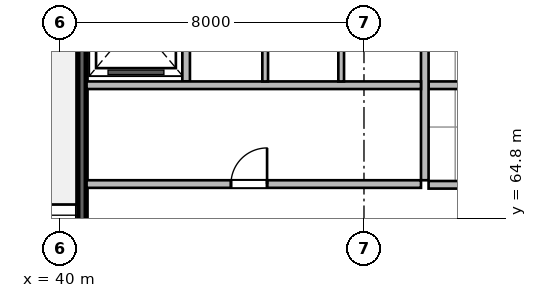
"""IFC4 building model, lengths in metres.
Left out: names, types, materials, properties, quantities, classifications, styles, units other than length and angle.
Written with IfcOpenShell. Run it as: python <this file> out.ifc"""

import sys

from ifc_helpers import new_model, si_unit, direction, frame, frame_2d, origin, place, context, subcontext, project, spatial, rectangle, extrude, source, transform, mapped, element, fill, save


model = new_model("IFC4")
c1 = context("Model", 3, precision=1e-05, world=origin(), true_north=direction((0.0, 1.0)))
c2 = subcontext(c1, "Body", "Model", "MODEL_VIEW")
j1 = project(units=[si_unit("LENGTHUNIT", "METRE"), si_unit("PLANEANGLEUNIT", "RADIAN")], contexts=[c1])
p1 = place(None, origin())
s1 = spatial("IfcSite", under=j1, at=p1, CompositionType="ELEMENT")
p2 = place(p1, origin())
s2 = spatial("IfcBuilding", under=s1, at=p2, CompositionType="ELEMENT")
p3 = place(p2, frame((0.0, 0.0, 275.7)))
s3 = spatial("IfcBuildingStorey", under=s2, at=p3, CompositionType="ELEMENT", Elevation=275.7)
m1 = source(origin(), c2, "Body", "SweptSolid", [
    extrude(rectangle(XDim=11.2, YDim=0.22, at=frame_2d((5.6, 0.0))), origin(), (0.0, 0.0, 1.0), 3.9),
])
p4 = place(p3, frame((40.58, 60.6, 0.0), z_axis=(0.0, 0.0, 1.0), x_axis=(0.0, 1.0, 0.0)))
e1 = element("IfcWall", 1, at=p4, inside=s3, PredefinedType="SHEAR", context=c2, shape_type="MappedRepresentation", body=[
    mapped(m1, transform((0.0, 0.0, 0.0), scale=1.0)),
])
m2 = source(origin(), c2, "Body", "SweptSolid", [
    extrude(rectangle(XDim=5.62, YDim=0.2, at=frame_2d((2.81, 0.0))), origin(), (0.0, 0.0, 1.0), 3.64),
])
p5 = place(p3, frame((49.7, 68.3, 0.0), z_axis=(0.0, 0.0, 1.0), x_axis=(1.0, 0.0, 0.0)))
e2 = element("IfcWall", 2, at=p5, inside=s3, PredefinedType="SOLIDWALL", context=c2, shape_type="MappedRepresentation", body=[
    mapped(m2, transform((0.0, 0.0, 0.0), scale=1.0)),
])
p6 = place(p5, frame((1.6, 0.0, 0.0)))
e3 = element("IfcOpeningElement", 3, at=p6, cuts=e2, PredefinedType="OPENING", context=c2, shape_type="SweptSolid", body=[
    extrude(rectangle(XDim=1.1, YDim=2.15, at=frame_2d((0.55, 1.075))), frame((0.0, 0.11, 0.0), z_axis=(0.0, -1.0, 0.0), x_axis=(1.0, 0.0, 0.0)), (0.0, 0.0, 1.0), 0.22),
])
p7 = place(p5, frame((3.7, 0.0, 0.0)))
e4 = element("IfcOpeningElement", 4, at=p7, cuts=e2, PredefinedType="OPENING", context=c2, shape_type="SweptSolid", body=[
    extrude(rectangle(XDim=1.1, YDim=2.15, at=frame_2d((0.55, 1.075))), frame((0.0, 0.11, 0.0), z_axis=(0.0, -1.0, 0.0), x_axis=(1.0, 0.0, 0.0)), (0.0, 0.0, 1.0), 0.22),
])
m3 = source(origin(), c2, "Body", "SweptSolid", [
    extrude(rectangle(XDim=5.8, YDim=0.2, at=frame_2d((2.9, 0.0))), origin(), (0.0, 0.0, 1.0), 3.64),
])
p8 = place(p3, frame((49.6, 65.8, 0.0), z_axis=(0.0, 0.0, 1.0), x_axis=(0.0, 1.0, 0.0)))
e5 = element("IfcWall", 5, at=p8, inside=s3, PredefinedType="SOLIDWALL", context=c2, shape_type="MappedRepresentation", body=[
    mapped(m3, transform((0.0, 0.0, 0.0), scale=1.0)),
])
p9 = place(p3, frame((49.7, 65.68, 0.0), z_axis=(0.0, 0.0, 1.0), x_axis=(1.0, 0.0, 0.0)))
e6 = element("IfcWall", 6, at=p9, inside=s3, PredefinedType="SOLIDWALL", context=c2, shape_type="MappedRepresentation", body=[
    mapped(m2, transform((0.0, 0.0, 0.0), scale=1.0)),
])
m4 = source(origin(), c2, "Body", "SweptSolid", [
    extrude(rectangle(XDim=3.2, YDim=0.2, at=frame_2d((1.6, 0.0))), origin(), (0.0, 0.0, 1.0), 3.64),
])
p10 = place(p3, frame((43.32, 68.4, 0.0), z_axis=(0.0, 0.0, 1.0), x_axis=(0.0, 1.0, 0.0)))
e7 = element("IfcWall", 7, at=p10, inside=s3, PredefinedType="SOLIDWALL", context=c2, shape_type="MappedRepresentation", body=[
    mapped(m4, transform((0.0, 0.0, 0.0), scale=1.0)),
])
m5 = source(origin(), c2, "Body", "SweptSolid", [
    extrude(rectangle(XDim=8.8, YDim=0.2, at=frame_2d((4.4, 0.0))), origin(), (0.0, 0.0, 1.0), 3.64),
])
p11 = place(p3, frame((40.7, 68.3, 0.0), z_axis=(0.0, 0.0, 1.0), x_axis=(1.0, 0.0, 0.0)))
e8 = element("IfcWall", 8, at=p11, inside=s3, PredefinedType="SOLIDWALL", context=c2, shape_type="MappedRepresentation", body=[
    mapped(m5, transform((0.0, 0.0, 0.0), scale=1.0)),
])
m6 = source(origin(), c2, "Body", "SweptSolid", [
    extrude(rectangle(XDim=3.38, YDim=0.15, at=frame_2d((1.69, 0.0))), origin(), (0.0, 0.0, 1.0), 3.64),
])
for number, where, z_axis, x_axis in (
    (9, (45.4, 68.4, 0.0), (0.0, 0.0, 1.0), (0.0, 1.0, 0.0)),
    (10, (47.4, 68.4, 0.0), (0.0, 0.0, 1.0), (0.0, 1.0, 0.0)),
):
    element("IfcWall", number, at=place(p3, frame(where, z_axis=z_axis, x_axis=x_axis)), inside=s3, PredefinedType="PARTITIONING", context=c2, shape_type="MappedRepresentation", body=[
        mapped(m6, transform((0.0, 0.0, 0.0), scale=1.0)),
    ])
p12 = place(p3, frame((40.7, 65.7, 0.0), z_axis=(0.0, 0.0, 1.0), x_axis=(1.0, 0.0, 0.0)))
e11 = element("IfcWall", 11, at=p12, inside=s3, PredefinedType="SOLIDWALL", context=c2, shape_type="MappedRepresentation", body=[
    mapped(m5, transform((0.0, 0.0, 0.0), scale=1.0)),
])
p13 = place(p12, frame((3.8, 0.0, 0.0)))
e12 = element("IfcOpeningElement", 12, at=p13, cuts=e11, PredefinedType="OPENING", context=c2, shape_type="SweptSolid", body=[
    extrude(rectangle(XDim=0.95, YDim=2.15, at=frame_2d((0.475, 1.075))), frame((0.0, 0.11, 0.0), z_axis=(0.0, -1.0, 0.0), x_axis=(1.0, 0.0, 0.0)), (0.0, 0.0, 1.0), 0.22),
])
m7 = source(origin(), c2, "Body", "SweptSolid", [
    extrude(rectangle(XDim=0.95, YDim=2.15, at=frame_2d((0.475, 1.075))), frame((0.0, 0.025, 0.0), z_axis=(0.0, -1.0, 0.0), x_axis=(1.0, 0.0, 0.0)), (0.0, 0.0, 1.0), 0.05),
])
p14 = place(p13, origin())
e13 = element("IfcDoor", 13, at=p14, inside=s3, OperationType="SINGLE_SWING_RIGHT", PredefinedType="DOOR", context=c2, shape_type="MappedRepresentation", body=[
    mapped(m7, transform((0.0, 0.0, 0.0), scale=1.0)),
])
fill(e12, e13)
save(model, sys.argv[1])
